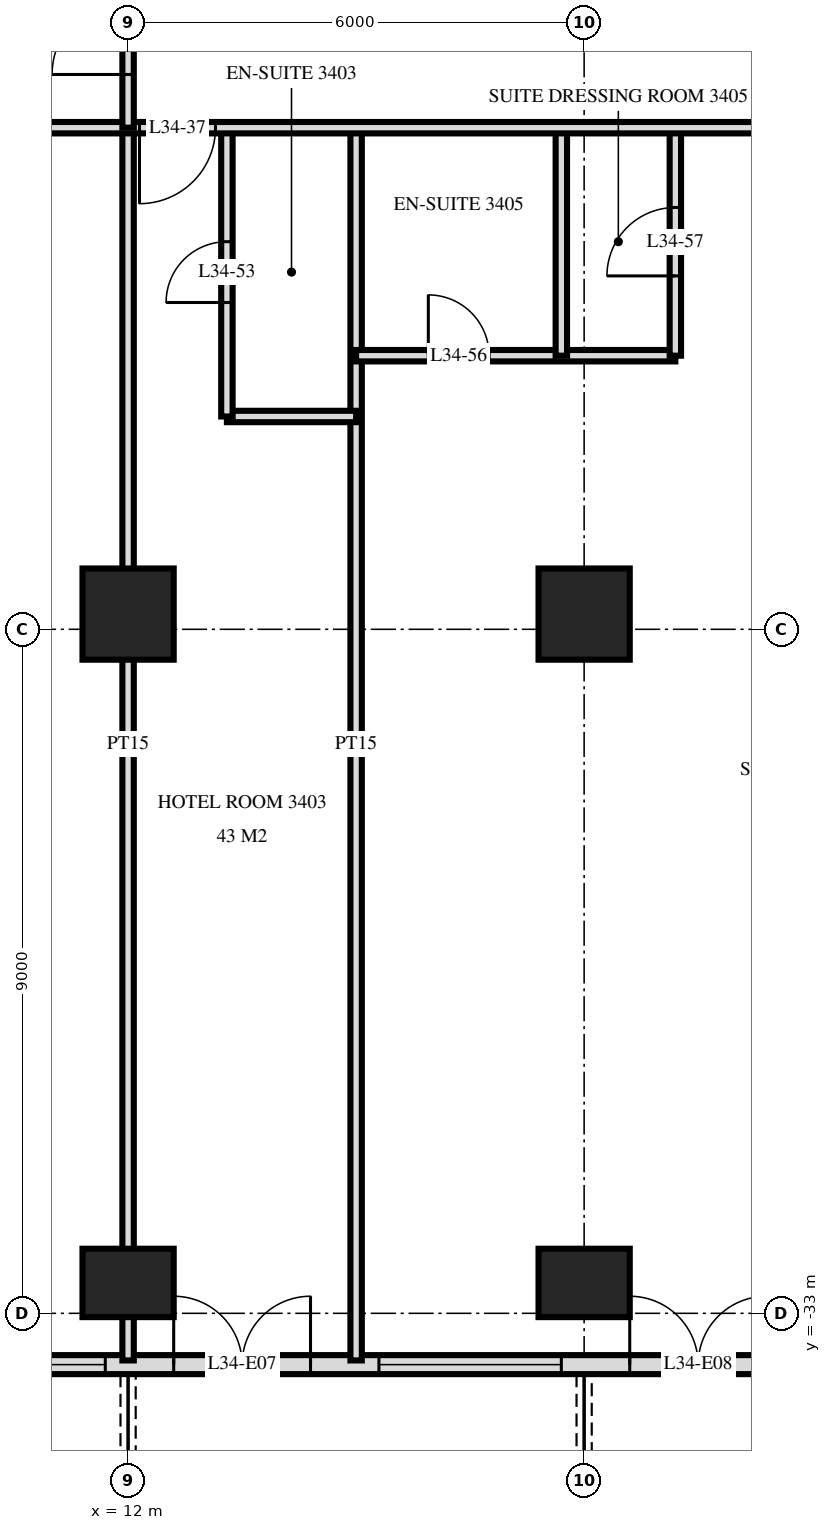
"""IFC4 building model, lengths in metres.
Left out: names, types, materials, properties, quantities, classifications, styles, units other than length and angle.
Written with IfcOpenShell. Run it as: python <this file> out.ifc"""

import sys

from ifc_helpers import new_model, si_unit, direction, frame, frame_2d, origin, origin_2d, place, context, subcontext, project, spatial, rectangle, extrude, element, fill, save


model = new_model("IFC4")
c1 = context("Model", 3, precision=1e-05, world=origin(), true_north=direction((0.0, 1.0)))
c2 = subcontext(c1, "Body", "Model", "MODEL_VIEW")
j1 = project(units=[si_unit("LENGTHUNIT", "METRE"), si_unit("PLANEANGLEUNIT", "RADIAN")], contexts=[c1])
p1 = place(None, origin())
s1 = spatial("IfcSite", under=j1, at=p1, CompositionType="ELEMENT")
p2 = place(p1, origin())
s2 = spatial("IfcBuilding", under=s1, at=p2, CompositionType="ELEMENT")
p3 = place(p2, frame((0.0, 0.0, 134.4)))
s3 = spatial("IfcBuildingStorey", under=s2, at=p3, CompositionType="ELEMENT", Elevation=134.4)
p4 = place(p3, frame((12.0, -32.6, 0.0), z_axis=(0.0, 0.0, 1.0), x_axis=(1.0, 0.0, 0.0)))
e1 = element("IfcColumn", 1, at=p4, inside=s3, PredefinedType="COLUMN", context=c2, shape_type="SweptSolid", body=[
    extrude(rectangle(XDim=1.2, YDim=0.9, at=origin_2d()), origin(), (0.0, 0.0, 1.0), 3.6),
])
p5 = place(p3, frame((12.0, -23.8, 0.0), z_axis=(0.0, 0.0, 1.0), x_axis=(1.0, 0.0, 0.0)))
e2 = element("IfcColumn", 2, at=p5, inside=s3, PredefinedType="COLUMN", context=c2, shape_type="SweptSolid", body=[
    extrude(rectangle(XDim=1.2, YDim=1.2, at=origin_2d()), origin(), (0.0, 0.0, 1.0), 3.6),
])
p6 = place(p3, frame((18.0, -32.6, 0.0), z_axis=(0.0, 0.0, 1.0), x_axis=(1.0, 0.0, 0.0)))
e3 = element("IfcColumn", 3, at=p6, inside=s3, PredefinedType="COLUMN", context=c2, shape_type="SweptSolid", body=[
    extrude(rectangle(XDim=1.2, YDim=0.9, at=origin_2d()), origin(), (0.0, 0.0, 1.0), 3.6),
])
p7 = place(p3, frame((18.0, -23.8, 0.0), z_axis=(0.0, 0.0, 1.0), x_axis=(1.0, 0.0, 0.0)))
e4 = element("IfcColumn", 4, at=p7, inside=s3, PredefinedType="COLUMN", context=c2, shape_type="SweptSolid", body=[
    extrude(rectangle(XDim=1.2, YDim=1.2, at=origin_2d()), origin(), (0.0, 0.0, 1.0), 3.6),
])
p8 = place(p3, frame((-23.675, -33.675, 0.0), z_axis=(0.0, 0.0, 1.0), x_axis=(1.0, 0.0, 0.0)))
e5 = element("IfcWall", 5, at=p8, inside=s3, PredefinedType="SOLIDWALL", context=c2, shape_type="SweptSolid", body=[
    extrude(rectangle(XDim=47.351, YDim=0.25, at=frame_2d((23.675, 0.0))), origin(), (0.0, 0.0, 1.0), 3.32),
])
p9 = place(p8, frame((0.575, 0.0, 0.0)))
e6 = element("IfcOpeningElement", 6, at=p9, cuts=e5, PredefinedType="OPENING", context=c2, shape_type="SweptSolid", body=[
    extrude(rectangle(XDim=1.8, YDim=2.4, at=frame_2d((0.9, 1.2))), frame((0.0, 0.135, 0.0), z_axis=(0.0, -1.0, 0.0), x_axis=(1.0, 0.0, 0.0)), (0.0, 0.0, 1.0), 0.27),
])
p10 = place(p8, frame((3.425, 0.0, 0.3)))
e7 = element("IfcOpeningElement", 7, at=p10, cuts=e5, PredefinedType="OPENING", context=c2, shape_type="SweptSolid", body=[
    extrude(rectangle(XDim=1.8, YDim=2.1, at=frame_2d((0.9, 1.05))), frame((0.0, 0.135, 0.0), z_axis=(0.0, -1.0, 0.0), x_axis=(1.0, 0.0, 0.0)), (0.0, 0.0, 1.0), 0.27),
])
p11 = place(p8, frame((5.975, 0.0, 0.3)))
e8 = element("IfcOpeningElement", 8, at=p11, cuts=e5, PredefinedType="OPENING", context=c2, shape_type="SweptSolid", body=[
    extrude(rectangle(XDim=2.4, YDim=2.1, at=frame_2d((1.2, 1.05))), frame((0.0, 0.135, 0.0), z_axis=(0.0, -1.0, 0.0), x_axis=(1.0, 0.0, 0.0)), (0.0, 0.0, 1.0), 0.27),
])
p12 = place(p8, frame((9.275, 0.0, 0.0)))
e9 = element("IfcOpeningElement", 9, at=p12, cuts=e5, PredefinedType="OPENING", context=c2, shape_type="SweptSolid", body=[
    extrude(rectangle(XDim=1.8, YDim=2.4, at=frame_2d((0.9, 1.2))), frame((0.0, 0.135, 0.0), z_axis=(0.0, -1.0, 0.0), x_axis=(1.0, 0.0, 0.0)), (0.0, 0.0, 1.0), 0.27),
])
p13 = place(p8, frame((12.275, 0.0, 0.0)))
e10 = element("IfcOpeningElement", 10, at=p13, cuts=e5, PredefinedType="OPENING", context=c2, shape_type="SweptSolid", body=[
    extrude(rectangle(XDim=1.8, YDim=2.4, at=frame_2d((0.9, 1.2))), frame((0.0, 0.135, 0.0), z_axis=(0.0, -1.0, 0.0), x_axis=(1.0, 0.0, 0.0)), (0.0, 0.0, 1.0), 0.27),
])
p14 = place(p8, frame((14.975, 0.0, 0.3)))
e11 = element("IfcOpeningElement", 11, at=p14, cuts=e5, PredefinedType="OPENING", context=c2, shape_type="SweptSolid", body=[
    extrude(rectangle(XDim=2.4, YDim=2.1, at=frame_2d((1.2, 1.05))), frame((0.0, 0.135, 0.0), z_axis=(0.0, -1.0, 0.0), x_axis=(1.0, 0.0, 0.0)), (0.0, 0.0, 1.0), 0.27),
])
p15 = place(p8, frame((17.975, 0.0, 0.3)))
e12 = element("IfcOpeningElement", 12, at=p15, cuts=e5, PredefinedType="OPENING", context=c2, shape_type="SweptSolid", body=[
    extrude(rectangle(XDim=2.4, YDim=2.1, at=frame_2d((1.2, 1.05))), frame((0.0, 0.135, 0.0), z_axis=(0.0, -1.0, 0.0), x_axis=(1.0, 0.0, 0.0)), (0.0, 0.0, 1.0), 0.27),
])
p16 = place(p8, frame((21.275, 0.0, 0.0)))
e13 = element("IfcOpeningElement", 13, at=p16, cuts=e5, PredefinedType="OPENING", context=c2, shape_type="SweptSolid", body=[
    extrude(rectangle(XDim=1.8, YDim=2.4, at=frame_2d((0.9, 1.2))), frame((0.0, 0.135, 0.0), z_axis=(0.0, -1.0, 0.0), x_axis=(1.0, 0.0, 0.0)), (0.0, 0.0, 1.0), 0.27),
])
p17 = place(p8, frame((24.275, 0.0, 0.0)))
e14 = element("IfcOpeningElement", 14, at=p17, cuts=e5, PredefinedType="OPENING", context=c2, shape_type="SweptSolid", body=[
    extrude(rectangle(XDim=1.8, YDim=2.4, at=frame_2d((0.9, 1.2))), frame((0.0, 0.135, 0.0), z_axis=(0.0, -1.0, 0.0), x_axis=(1.0, 0.0, 0.0)), (0.0, 0.0, 1.0), 0.27),
])
p18 = place(p8, frame((26.975, 0.0, 0.3)))
e15 = element("IfcOpeningElement", 15, at=p18, cuts=e5, PredefinedType="OPENING", context=c2, shape_type="SweptSolid", body=[
    extrude(rectangle(XDim=2.4, YDim=2.1, at=frame_2d((1.2, 1.05))), frame((0.0, 0.135, 0.0), z_axis=(0.0, -1.0, 0.0), x_axis=(1.0, 0.0, 0.0)), (0.0, 0.0, 1.0), 0.27),
])
p19 = place(p8, frame((30.275, 0.0, 0.0)))
e16 = element("IfcOpeningElement", 16, at=p19, cuts=e5, PredefinedType="OPENING", context=c2, shape_type="SweptSolid", body=[
    extrude(rectangle(XDim=1.8, YDim=2.4, at=frame_2d((0.9, 1.2))), frame((0.0, 0.135, 0.0), z_axis=(0.0, -1.0, 0.0), x_axis=(1.0, 0.0, 0.0)), (0.0, 0.0, 1.0), 0.27),
])
p20 = place(p8, frame((32.975, 0.0, 0.3)))
e17 = element("IfcOpeningElement", 17, at=p20, cuts=e5, PredefinedType="OPENING", context=c2, shape_type="SweptSolid", body=[
    extrude(rectangle(XDim=2.4, YDim=2.1, at=frame_2d((1.2, 1.05))), frame((0.0, 0.135, 0.0), z_axis=(0.0, -1.0, 0.0), x_axis=(1.0, 0.0, 0.0)), (0.0, 0.0, 1.0), 0.27),
])
p21 = place(p8, frame((36.275, 0.0, 0.0)))
e18 = element("IfcOpeningElement", 18, at=p21, cuts=e5, PredefinedType="OPENING", context=c2, shape_type="SweptSolid", body=[
    extrude(rectangle(XDim=1.8, YDim=2.4, at=frame_2d((0.9, 1.2))), frame((0.0, 0.135, 0.0), z_axis=(0.0, -1.0, 0.0), x_axis=(1.0, 0.0, 0.0)), (0.0, 0.0, 1.0), 0.27),
])
p22 = place(p8, frame((38.975, 0.0, 0.3)))
e19 = element("IfcOpeningElement", 19, at=p22, cuts=e5, PredefinedType="OPENING", context=c2, shape_type="SweptSolid", body=[
    extrude(rectangle(XDim=2.4, YDim=2.1, at=frame_2d((1.2, 1.05))), frame((0.0, 0.135, 0.0), z_axis=(0.0, -1.0, 0.0), x_axis=(1.0, 0.0, 0.0)), (0.0, 0.0, 1.0), 0.27),
])
p23 = place(p8, frame((42.275, 0.0, 0.0)))
e20 = element("IfcOpeningElement", 20, at=p23, cuts=e5, PredefinedType="OPENING", context=c2, shape_type="SweptSolid", body=[
    extrude(rectangle(XDim=1.8, YDim=2.4, at=frame_2d((0.9, 1.2))), frame((0.0, 0.135, 0.0), z_axis=(0.0, -1.0, 0.0), x_axis=(1.0, 0.0, 0.0)), (0.0, 0.0, 1.0), 0.27),
])
p24 = place(p8, frame((45.125, 0.0, 0.3)))
e21 = element("IfcOpeningElement", 21, at=p24, cuts=e5, PredefinedType="OPENING", context=c2, shape_type="SweptSolid", body=[
    extrude(rectangle(XDim=1.8, YDim=2.1, at=frame_2d((0.9, 1.05))), frame((0.0, 0.135, 0.0), z_axis=(0.0, -1.0, 0.0), x_axis=(1.0, 0.0, 0.0)), (0.0, 0.0, 1.0), 0.27),
])
p25 = place(p3, frame((19.2, -20.4, 0.0), z_axis=(0.0, 0.0, 1.0), x_axis=(0.0, 1.0, 0.0)))
e22 = element("IfcWall", 22, at=p25, inside=s3, PredefinedType="PARTITIONING", context=c2, shape_type="SweptSolid", body=[
    extrude(rectangle(XDim=3.0, YDim=0.15, at=frame_2d((1.5, 0.0))), origin(), (0.0, 0.0, 1.0), 3.32),
])
p26 = place(p25, frame((1.05, 0.0, 0.0)))
e23 = element("IfcOpeningElement", 23, at=p26, cuts=e22, PredefinedType="OPENING", context=c2, shape_type="SweptSolid", body=[
    extrude(rectangle(XDim=0.9, YDim=2.1, at=frame_2d((0.45, 1.05))), frame((0.0, 0.085, 0.0), z_axis=(0.0, -1.0, 0.0), x_axis=(1.0, 0.0, 0.0)), (0.0, 0.0, 1.0), 0.17),
])
p27 = place(p3, frame((17.7, -20.4, 0.0), z_axis=(0.0, 0.0, 1.0), x_axis=(0.0, 1.0, 0.0)))
e24 = element("IfcWall", 24, at=p27, inside=s3, PredefinedType="PARTITIONING", context=c2, shape_type="SweptSolid", body=[
    extrude(rectangle(XDim=3.0, YDim=0.15, at=frame_2d((1.5, 0.0))), origin(), (0.0, 0.0, 1.0), 3.32),
])
p28 = place(p3, frame((15.0, -33.62, 0.0), z_axis=(0.0, 0.0, 1.0), x_axis=(0.0, 1.0, 0.0)))
e25 = element("IfcWall", 25, at=p28, inside=s3, PredefinedType="PARTITIONING", context=c2, shape_type="SweptSolid", body=[
    extrude(rectangle(XDim=16.22, YDim=0.15, at=frame_2d((8.11, 0.0))), origin(), (0.0, 0.0, 1.0), 3.32),
])
p29 = place(p3, frame((13.3, -21.2, 0.0), z_axis=(0.0, 0.0, 1.0), x_axis=(0.0, 1.0, 0.0)))
e26 = element("IfcWall", 26, at=p29, inside=s3, PredefinedType="PARTITIONING", context=c2, shape_type="SweptSolid", body=[
    extrude(rectangle(XDim=3.8, YDim=0.15, at=frame_2d((1.9, 0.0))), origin(), (0.0, 0.0, 1.0), 3.32),
])
p30 = place(p29, frame((1.5, 0.0, 0.0)))
e27 = element("IfcOpeningElement", 27, at=p30, cuts=e26, PredefinedType="OPENING", context=c2, shape_type="SweptSolid", body=[
    extrude(rectangle(XDim=0.8, YDim=2.1, at=frame_2d((0.4, 1.05))), frame((0.0, 0.085, 0.0), z_axis=(0.0, -1.0, 0.0), x_axis=(1.0, 0.0, 0.0)), (0.0, 0.0, 1.0), 0.17),
])
p31 = place(p3, frame((12.0, -17.4, 0.0), z_axis=(0.0, 0.0, 1.0), x_axis=(0.0, 1.0, 0.0)))
e28 = element("IfcWall", 28, at=p31, inside=s3, PredefinedType="PARTITIONING", context=c2, shape_type="SweptSolid", body=[
    extrude(rectangle(XDim=2.35, YDim=0.15, at=frame_2d((1.175, 0.0))), origin(), (0.0, 0.0, 1.0), 3.32),
])
p32 = place(p31, frame((0.7, 0.0, 0.0)))
e29 = element("IfcOpeningElement", 29, at=p32, cuts=e28, PredefinedType="OPENING", context=c2, shape_type="SweptSolid", body=[
    extrude(rectangle(XDim=1.0, YDim=2.1, at=frame_2d((0.5, 1.05))), frame((0.0, 0.085, 0.0), z_axis=(0.0, -1.0, 0.0), x_axis=(1.0, 0.0, 0.0)), (0.0, 0.0, 1.0), 0.17),
])
p33 = place(p3, frame((12.0, -33.62, 0.0), z_axis=(0.0, 0.0, 1.0), x_axis=(0.0, 1.0, 0.0)))
e30 = element("IfcWall", 30, at=p33, inside=s3, PredefinedType="PARTITIONING", context=c2, shape_type="SweptSolid", body=[
    extrude(rectangle(XDim=16.22, YDim=0.15, at=frame_2d((8.11, 0.0))), origin(), (0.0, 0.0, 1.0), 3.32),
])
p34 = place(p3, frame((13.3, -21.2, 0.0), z_axis=(0.0, 0.0, 1.0), x_axis=(1.0, 0.0, 0.0)))
e31 = element("IfcWall", 31, at=p34, inside=s3, PredefinedType="PARTITIONING", context=c2, shape_type="SweptSolid", body=[
    extrude(rectangle(XDim=1.7, YDim=0.15, at=frame_2d((0.85, 0.0))), origin(), (0.0, 0.0, 1.0), 3.32),
])
p35 = place(p3, frame((15.0, -20.4, 0.0), z_axis=(0.0, 0.0, 1.0), x_axis=(1.0, 0.0, 0.0)))
e32 = element("IfcWall", 32, at=p35, inside=s3, PredefinedType="PARTITIONING", context=c2, shape_type="SweptSolid", body=[
    extrude(rectangle(XDim=4.2, YDim=0.15, at=frame_2d((2.1, 0.0))), origin(), (0.0, 0.0, 1.0), 3.32),
])
p36 = place(p35, frame((0.95, 0.0, 0.0)))
e33 = element("IfcOpeningElement", 33, at=p36, cuts=e32, PredefinedType="OPENING", context=c2, shape_type="SweptSolid", body=[
    extrude(rectangle(XDim=0.8, YDim=2.1, at=frame_2d((0.4, 1.05))), frame((0.0, 0.085, 0.0), z_axis=(0.0, -1.0, 0.0), x_axis=(1.0, 0.0, 0.0)), (0.0, 0.0, 1.0), 0.17),
])
p37 = place(p3, frame((-28.02, -17.4, 0.0), z_axis=(0.0, 0.0, 1.0), x_axis=(1.0, 0.0, 0.0)))
e34 = element("IfcWall", 34, at=p37, inside=s3, PredefinedType="PARTITIONING", context=c2, shape_type="SweptSolid", body=[
    extrude(rectangle(XDim=56.04, YDim=0.15, at=frame_2d((28.02, 0.0))), origin(), (0.0, 0.0, 1.0), 3.32),
])
p38 = place(p37, frame((13.17, 0.0, 0.0)))
e35 = element("IfcOpeningElement", 35, at=p38, cuts=e34, PredefinedType="OPENING", context=c2, shape_type="SweptSolid", body=[
    extrude(rectangle(XDim=1.0, YDim=2.1, at=frame_2d((0.5, 1.05))), frame((0.0, 0.085, 0.0), z_axis=(0.0, -1.0, 0.0), x_axis=(1.0, 0.0, 0.0)), (0.0, 0.0, 1.0), 0.17),
])
p39 = place(p37, frame((11.87, 0.0, 0.0)))
e36 = element("IfcOpeningElement", 36, at=p39, cuts=e34, PredefinedType="OPENING", context=c2, shape_type="SweptSolid", body=[
    extrude(rectangle(XDim=1.0, YDim=2.1, at=frame_2d((0.5, 1.05))), frame((0.0, 0.085, 0.0), z_axis=(0.0, -1.0, 0.0), x_axis=(1.0, 0.0, 0.0)), (0.0, 0.0, 1.0), 0.17),
])
p40 = place(p37, frame((2.32, 0.0, 0.0)))
e37 = element("IfcOpeningElement", 37, at=p40, cuts=e34, PredefinedType="OPENING", context=c2, shape_type="SweptSolid", body=[
    extrude(rectangle(XDim=1.0, YDim=2.1, at=frame_2d((0.5, 1.05))), frame((0.0, 0.085, 0.0), z_axis=(0.0, -1.0, 0.0), x_axis=(1.0, 0.0, 0.0)), (0.0, 0.0, 1.0), 0.17),
])
p41 = place(p37, frame((40.17, 0.0, 0.0)))
e38 = element("IfcOpeningElement", 38, at=p41, cuts=e34, PredefinedType="OPENING", context=c2, shape_type="SweptSolid", body=[
    extrude(rectangle(XDim=1.0, YDim=2.1, at=frame_2d((0.5, 1.05))), frame((0.0, 0.085, 0.0), z_axis=(0.0, -1.0, 0.0), x_axis=(1.0, 0.0, 0.0)), (0.0, 0.0, 1.0), 0.17),
])
p42 = place(p37, frame((51.22, 0.0, 0.0)))
e39 = element("IfcOpeningElement", 39, at=p42, cuts=e34, PredefinedType="OPENING", context=c2, shape_type="SweptSolid", body=[
    extrude(rectangle(XDim=1.0, YDim=2.1, at=frame_2d((0.5, 1.05))), frame((0.0, 0.085, 0.0), z_axis=(0.0, -1.0, 0.0), x_axis=(1.0, 0.0, 0.0)), (0.0, 0.0, 1.0), 0.17),
])
p43 = place(p37, frame((18.52, 0.0, 0.0)))
e40 = element("IfcOpeningElement", 40, at=p43, cuts=e34, PredefinedType="OPENING", context=c2, shape_type="SweptSolid", body=[
    extrude(rectangle(XDim=1.0, YDim=2.1, at=frame_2d((0.5, 1.05))), frame((0.0, 0.085, 0.0), z_axis=(0.0, -1.0, 0.0), x_axis=(1.0, 0.0, 0.0)), (0.0, 0.0, 1.0), 0.17),
])
p44 = place(p37, frame((26.02, 0.0, 0.0)))
e41 = element("IfcOpeningElement", 41, at=p44, cuts=e34, PredefinedType="OPENING", context=c2, shape_type="SweptSolid", body=[
    extrude(rectangle(XDim=1.0, YDim=2.1, at=frame_2d((0.5, 1.05))), frame((0.0, 0.085, 0.0), z_axis=(0.0, -1.0, 0.0), x_axis=(1.0, 0.0, 0.0)), (0.0, 0.0, 1.0), 0.17),
])
p45 = place(p37, frame((35.02, 0.0, 0.0)))
e42 = element("IfcOpeningElement", 42, at=p45, cuts=e34, PredefinedType="OPENING", context=c2, shape_type="SweptSolid", body=[
    extrude(rectangle(XDim=1.0, YDim=2.1, at=frame_2d((0.5, 1.05))), frame((0.0, 0.085, 0.0), z_axis=(0.0, -1.0, 0.0), x_axis=(1.0, 0.0, 0.0)), (0.0, 0.0, 1.0), 0.17),
])
p46 = place(p20, origin())
e43 = element("IfcWindow", 43, at=p46, inside=s3, PartitioningType="SINGLE_PANEL", PredefinedType="WINDOW", context=c2, shape_type="SweptSolid", body=[
    extrude(rectangle(XDim=2.4, YDim=2.1, at=frame_2d((1.2, 1.05))), frame((0.0, 0.03, 0.0), z_axis=(0.0, -1.0, 0.0), x_axis=(1.0, 0.0, 0.0)), (0.0, 0.0, 1.0), 0.06),
])
fill(e17, e43)
p47 = place(p21, origin())
e44 = element("IfcDoor", 44, at=p47, inside=s3, OperationType="DOUBLE_DOOR_SINGLE_SWING", PredefinedType="DOOR", context=c2, shape_type="SweptSolid", body=[
    extrude(rectangle(XDim=1.8, YDim=2.4, at=frame_2d((0.9, 1.2))), frame((0.0, 0.025, 0.0), z_axis=(0.0, -1.0, 0.0), x_axis=(1.0, 0.0, 0.0)), (0.0, 0.0, 1.0), 0.05),
])
fill(e18, e44)
p48 = place(p22, origin())
e45 = element("IfcWindow", 45, at=p48, inside=s3, PartitioningType="SINGLE_PANEL", PredefinedType="WINDOW", context=c2, shape_type="SweptSolid", body=[
    extrude(rectangle(XDim=2.4, YDim=2.1, at=frame_2d((1.2, 1.05))), frame((0.0, 0.03, 0.0), z_axis=(0.0, -1.0, 0.0), x_axis=(1.0, 0.0, 0.0)), (0.0, 0.0, 1.0), 0.06),
])
fill(e19, e45)
p49 = place(p23, origin())
e46 = element("IfcDoor", 46, at=p49, inside=s3, OperationType="DOUBLE_DOOR_SINGLE_SWING", PredefinedType="DOOR", context=c2, shape_type="SweptSolid", body=[
    extrude(rectangle(XDim=1.8, YDim=2.4, at=frame_2d((0.9, 1.2))), frame((0.0, 0.025, 0.0), z_axis=(0.0, -1.0, 0.0), x_axis=(1.0, 0.0, 0.0)), (0.0, 0.0, 1.0), 0.05),
])
fill(e20, e46)
p50 = place(p32, origin())
e47 = element("IfcDoor", 47, at=p50, inside=s3, OperationType="SINGLE_SWING_RIGHT", PredefinedType="DOOR", context=c2, shape_type="SweptSolid", body=[
    extrude(rectangle(XDim=1.0, YDim=2.1, at=frame_2d((0.5, 1.05))), frame((0.0, 0.025, 0.0), z_axis=(0.0, -1.0, 0.0), x_axis=(1.0, 0.0, 0.0)), (0.0, 0.0, 1.0), 0.05),
])
fill(e29, e47)
p51 = place(p41, frame((0.5, 0.0, 0.0), z_axis=(0.0, 0.0, 1.0), x_axis=(-1.0, 0.0, 0.0)))
e48 = element("IfcDoor", 48, at=p51, inside=s3, OperationType="SINGLE_SWING_LEFT", PredefinedType="DOOR", context=c2, shape_type="SweptSolid", body=[
    extrude(rectangle(XDim=1.0, YDim=2.1, at=frame_2d((0.0, 1.05))), frame((0.0, -0.025, 0.0), z_axis=(0.0, 1.0, 0.0), x_axis=(-1.0, 0.0, 0.0)), (0.0, 0.0, 1.0), 0.05),
])
fill(e38, e48)
p52 = place(p30, origin())
e49 = element("IfcDoor", 49, at=p52, inside=s3, OperationType="SINGLE_SWING_RIGHT", PredefinedType="DOOR", context=c2, shape_type="SweptSolid", body=[
    extrude(rectangle(XDim=0.8, YDim=2.1, at=frame_2d((0.4, 1.05))), frame((0.0, 0.025, 0.0), z_axis=(0.0, -1.0, 0.0), x_axis=(1.0, 0.0, 0.0)), (0.0, 0.0, 1.0), 0.05),
])
fill(e27, e49)
p53 = place(p36, origin())
e50 = element("IfcDoor", 50, at=p53, inside=s3, OperationType="SINGLE_SWING_RIGHT", PredefinedType="DOOR", context=c2, shape_type="SweptSolid", body=[
    extrude(rectangle(XDim=0.8, YDim=2.1, at=frame_2d((0.4, 1.05))), frame((0.0, 0.025, 0.0), z_axis=(0.0, -1.0, 0.0), x_axis=(1.0, 0.0, 0.0)), (0.0, 0.0, 1.0), 0.05),
])
fill(e33, e50)
p54 = place(p26, origin())
e51 = element("IfcDoor", 51, at=p54, inside=s3, OperationType="SINGLE_SWING_RIGHT", PredefinedType="DOOR", context=c2, shape_type="SweptSolid", body=[
    extrude(rectangle(XDim=0.9, YDim=2.1, at=frame_2d((0.45, 1.05))), frame((0.0, 0.025, 0.0), z_axis=(0.0, -1.0, 0.0), x_axis=(1.0, 0.0, 0.0)), (0.0, 0.0, 1.0), 0.05),
])
fill(e23, e51)
save(model, sys.argv[1])
